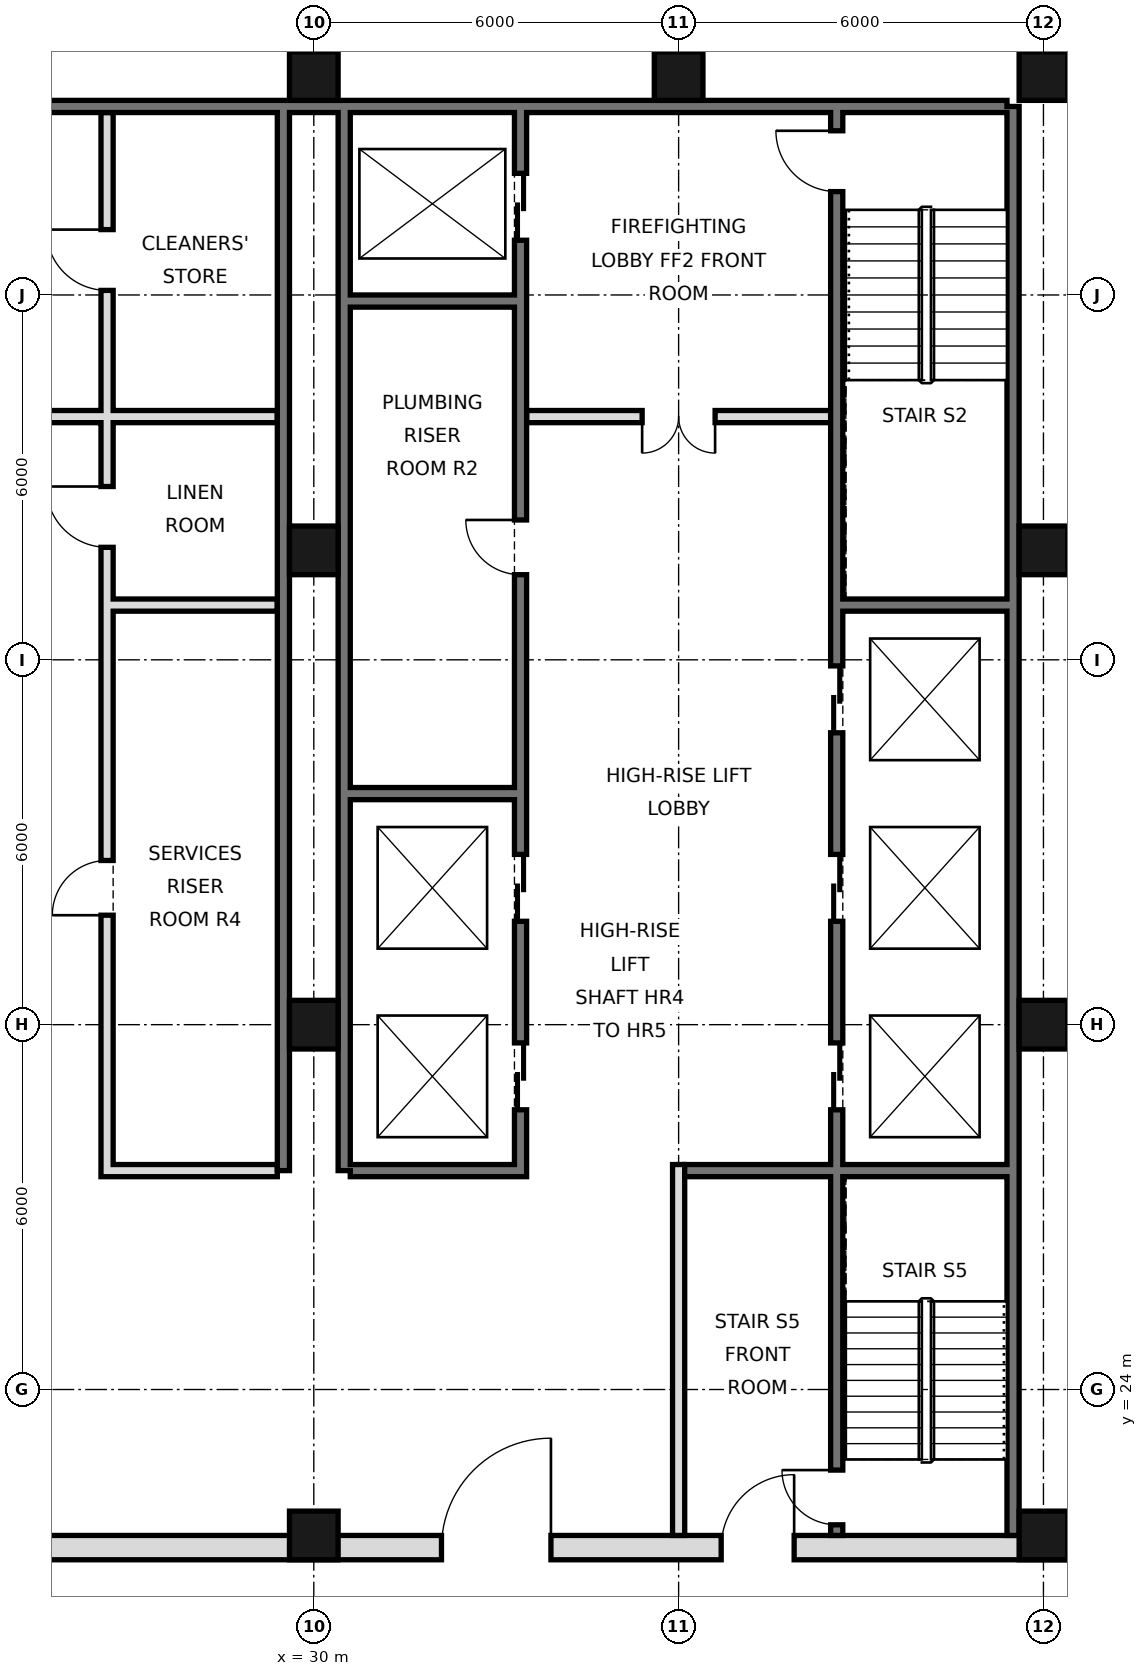
"""IFC4 building model, lengths in metres.
Left out: names, types, materials, properties, quantities, classifications, styles, units other than length and angle.
Written with IfcOpenShell. Run it as: python <this file> out.ifc"""

import sys

from ifc_helpers import new_model, si_unit, direction, frame, frame_2d, origin, origin_2d, place, context, subcontext, project, spatial, rectangle, hollow_rectangle, extrude, element, fill, save


model = new_model("IFC4")
c1 = context("Model", 3, precision=1e-05, world=origin(), true_north=direction((0.0, 1.0)))
c2 = subcontext(c1, "Body", "Model", "MODEL_VIEW")
j1 = project(units=[si_unit("LENGTHUNIT", "METRE"), si_unit("PLANEANGLEUNIT", "RADIAN")], contexts=[c1])
p1 = place(None, origin())
s1 = spatial("IfcSite", under=j1, at=p1, CompositionType="ELEMENT")
p2 = place(p1, origin())
s2 = spatial("IfcBuilding", under=s1, at=p2, CompositionType="ELEMENT")
p3 = place(p2, frame((0.0, 0.0, 298.0)))
s3 = spatial("IfcBuildingStorey", under=s2, at=p3, CompositionType="ELEMENT", Elevation=298.0)
for number, where, z_axis, x_axis in (
    (1, (30.0, 21.6, 0.0), (0.0, 0.0, 1.0), (1.0, 0.0, 0.0)),
    (2, (30.0, 30.0, 0.0), (0.0, 0.0, 1.0), (1.0, 0.0, 0.0)),
    (3, (30.0, 37.8, 0.0), (0.0, 0.0, 1.0), (1.0, 0.0, 0.0)),
    (4, (30.0, 45.6, 0.0), (0.0, 0.0, 1.0), (1.0, 0.0, 0.0)),
    (5, (36.0, 45.6, 0.0), (0.0, 0.0, 1.0), (1.0, 0.0, 0.0)),
    (6, (42.0, 21.6, 0.0), (0.0, 0.0, 1.0), (1.0, 0.0, 0.0)),
    (7, (42.0, 30.0, 0.0), (0.0, 0.0, 1.0), (1.0, 0.0, 0.0)),
    (8, (42.0, 37.8, 0.0), (0.0, 0.0, 1.0), (1.0, 0.0, 0.0)),
    (9, (42.0, 45.6, 0.0), (0.0, 0.0, 1.0), (1.0, 0.0, 0.0)),
):
    element("IfcColumn", number, at=place(p3, frame(where, z_axis=z_axis, x_axis=x_axis)), inside=s3, PredefinedType="COLUMN", context=c2, shape_type="SweptSolid", body=[
        extrude(hollow_rectangle(XDim=0.8, YDim=0.8, WallThickness=0.032, at=origin_2d()), origin(), (0.0, 0.0, 1.0), 3.6),
    ])
p4 = place(p3, frame((41.5, 21.6, 0.0), z_axis=(0.0, 0.0, 1.0), x_axis=(0.0, 1.0, 0.0)))
e10 = element("IfcWall", 10, at=p4, inside=s3, PredefinedType="SOLIDWALL", context=c2, shape_type="SweptSolid", body=[
    extrude(rectangle(XDim=23.5, YDim=0.2, at=frame_2d((11.75, 0.0))), origin(), (0.0, 0.0, 1.0), 3.42),
])
p5 = place(p3, frame((6.6, 45.1, 0.0), z_axis=(0.0, 0.0, 1.0), x_axis=(1.0, 0.0, 0.0)))
e11 = element("IfcWall", 11, at=p5, inside=s3, PredefinedType="SOLIDWALL", context=c2, shape_type="SweptSolid", body=[
    extrude(rectangle(XDim=34.8, YDim=0.2, at=frame_2d((17.4, 0.0))), origin(), (0.0, 0.0, 1.0), 3.42),
])
for number, where, z_axis, x_axis in (
    (12, (29.5, 27.6, 0.0), (0.0, 0.0, 1.0), (0.0, 1.0, 0.0)),
    (13, (30.5, 27.6, 0.0), (0.0, 0.0, 1.0), (0.0, 1.0, 0.0)),
):
    element("IfcWall", number, at=place(p3, frame(where, z_axis=z_axis, x_axis=x_axis)), inside=s3, PredefinedType="SOLIDWALL", context=c2, shape_type="SweptSolid", body=[
        extrude(rectangle(XDim=17.5, YDim=0.2, at=frame_2d((8.75, 0.0))), origin(), (0.0, 0.0, 1.0), 3.42),
    ])
p6 = place(p3, frame((5.6, 21.4, 0.0), z_axis=(0.0, 0.0, 1.0), x_axis=(1.0, 0.0, 0.0)))
e14 = element("IfcWall", 14, at=p6, inside=s3, PredefinedType="SOLIDWALL", context=c2, shape_type="SweptSolid", body=[
    extrude(rectangle(XDim=36.8, YDim=0.4, at=frame_2d((18.4, 0.0))), origin(), (0.0, 0.0, 1.0), 3.42),
])
p7 = place(p6, frame((8.5, 0.0, 0.0)))
e15 = element("IfcOpeningElement", 15, at=p7, cuts=e14, PredefinedType="OPENING", context=c2, shape_type="SweptSolid", body=[
    extrude(rectangle(XDim=1.8, YDim=2.1, at=frame_2d((0.9, 1.05))), frame((0.0, 0.21, 0.0), z_axis=(0.0, -1.0, 0.0), x_axis=(1.0, 0.0, 0.0)), (0.0, 0.0, 1.0), 0.42),
])
p8 = place(p6, frame((17.5, 0.0, 0.0)))
e16 = element("IfcOpeningElement", 16, at=p8, cuts=e14, PredefinedType="OPENING", context=c2, shape_type="SweptSolid", body=[
    extrude(rectangle(XDim=1.8, YDim=2.1, at=frame_2d((0.9, 1.05))), frame((0.0, 0.21, 0.0), z_axis=(0.0, -1.0, 0.0), x_axis=(1.0, 0.0, 0.0)), (0.0, 0.0, 1.0), 0.42),
])
p9 = place(p6, frame((26.5, 0.0, 0.0)))
e17 = element("IfcOpeningElement", 17, at=p9, cuts=e14, PredefinedType="OPENING", context=c2, shape_type="SweptSolid", body=[
    extrude(rectangle(XDim=1.8, YDim=2.1, at=frame_2d((0.9, 1.05))), frame((0.0, 0.21, 0.0), z_axis=(0.0, -1.0, 0.0), x_axis=(1.0, 0.0, 0.0)), (0.0, 0.0, 1.0), 0.42),
])
p10 = place(p6, frame((4.5, 0.0, 0.0)))
e18 = element("IfcOpeningElement", 18, at=p10, cuts=e14, PredefinedType="OPENING", context=c2, shape_type="SweptSolid", body=[
    extrude(rectangle(XDim=1.2, YDim=2.1, at=frame_2d((0.6, 1.05))), frame((0.0, 0.21, 0.0), z_axis=(0.0, -1.0, 0.0), x_axis=(1.0, 0.0, 0.0)), (0.0, 0.0, 1.0), 0.42),
])
p11 = place(p6, frame((31.1, 0.0, 0.0)))
e19 = element("IfcOpeningElement", 19, at=p11, cuts=e14, PredefinedType="OPENING", context=c2, shape_type="SweptSolid", body=[
    extrude(rectangle(XDim=1.2, YDim=2.1, at=frame_2d((0.6, 1.05))), frame((0.0, 0.21, 0.0), z_axis=(0.0, -1.0, 0.0), x_axis=(1.0, 0.0, 0.0)), (0.0, 0.0, 1.0), 0.42),
])
p12 = place(p3, frame((26.6, 27.5, 0.0), z_axis=(0.0, 0.0, 1.0), x_axis=(0.0, 1.0, 0.0)))
e20 = element("IfcWall", 20, at=p12, inside=s3, PredefinedType="SOLIDWALL", context=c2, shape_type="SweptSolid", body=[
    extrude(rectangle(XDim=17.5, YDim=0.2, at=frame_2d((8.75, 0.0))), origin(), (0.0, 0.0, 1.0), 3.42),
])
p13 = place(p12, frame((4.3, 0.0, 0.0)))
e21 = element("IfcOpeningElement", 21, at=p13, cuts=e20, PredefinedType="OPENING", context=c2, shape_type="SweptSolid", body=[
    extrude(rectangle(XDim=0.9, YDim=2.1, at=frame_2d((0.45, 1.05))), frame((0.0, 0.11, 0.0), z_axis=(0.0, -1.0, 0.0), x_axis=(1.0, 0.0, 0.0)), (0.0, 0.0, 1.0), 0.22),
])
p14 = place(p12, frame((10.35, 0.0, 0.0)))
e22 = element("IfcOpeningElement", 22, at=p14, cuts=e20, PredefinedType="OPENING", context=c2, shape_type="SweptSolid", body=[
    extrude(rectangle(XDim=1.0, YDim=2.1, at=frame_2d((0.5, 1.05))), frame((0.0, 0.11, 0.0), z_axis=(0.0, -1.0, 0.0), x_axis=(1.0, 0.0, 0.0)), (0.0, 0.0, 1.0), 0.22),
])
p15 = place(p12, frame((14.575, 0.0, 0.0)))
e23 = element("IfcOpeningElement", 23, at=p15, cuts=e20, PredefinedType="OPENING", context=c2, shape_type="SweptSolid", body=[
    extrude(rectangle(XDim=1.0, YDim=2.1, at=frame_2d((0.5, 1.05))), frame((0.0, 0.11, 0.0), z_axis=(0.0, -1.0, 0.0), x_axis=(1.0, 0.0, 0.0)), (0.0, 0.0, 1.0), 0.22),
])
p16 = place(p3, frame((33.4, 27.5, 0.0), z_axis=(0.0, 0.0, 1.0), x_axis=(0.0, 1.0, 0.0)))
e24 = element("IfcWall", 24, at=p16, inside=s3, PredefinedType="SOLIDWALL", context=c2, shape_type="SweptSolid", body=[
    extrude(rectangle(XDim=17.5, YDim=0.2, at=frame_2d((8.75, 0.0))), origin(), (0.0, 0.0, 1.0), 3.42),
])
p17 = place(p16, frame((1.1, 0.0, 0.0)))
e25 = element("IfcOpeningElement", 25, at=p17, cuts=e24, PredefinedType="OPENING", context=c2, shape_type="SweptSolid", body=[
    extrude(rectangle(XDim=1.1, YDim=2.1, at=frame_2d((0.55, 1.05))), frame((0.0, 0.11, 0.0), z_axis=(0.0, -1.0, 0.0), x_axis=(1.0, 0.0, 0.0)), (0.0, 0.0, 1.0), 0.22),
])
p18 = place(p16, frame((4.2, 0.0, 0.0)))
e26 = element("IfcOpeningElement", 26, at=p18, cuts=e24, PredefinedType="OPENING", context=c2, shape_type="SweptSolid", body=[
    extrude(rectangle(XDim=1.1, YDim=2.1, at=frame_2d((0.55, 1.05))), frame((0.0, 0.11, 0.0), z_axis=(0.0, -1.0, 0.0), x_axis=(1.0, 0.0, 0.0)), (0.0, 0.0, 1.0), 0.22),
])
p19 = place(p16, frame((15.4, 0.0, 0.0)))
e27 = element("IfcOpeningElement", 27, at=p19, cuts=e24, PredefinedType="OPENING", context=c2, shape_type="SweptSolid", body=[
    extrude(rectangle(XDim=1.1, YDim=2.1, at=frame_2d((0.55, 1.05))), frame((0.0, 0.11, 0.0), z_axis=(0.0, -1.0, 0.0), x_axis=(1.0, 0.0, 0.0)), (0.0, 0.0, 1.0), 0.22),
])
p20 = place(p16, frame((9.9, 0.0, 0.0)))
e28 = element("IfcOpeningElement", 28, at=p20, cuts=e24, PredefinedType="OPENING", context=c2, shape_type="SweptSolid", body=[
    extrude(rectangle(XDim=0.9, YDim=2.1, at=frame_2d((0.45, 1.05))), frame((0.0, 0.11, 0.0), z_axis=(0.0, -1.0, 0.0), x_axis=(1.0, 0.0, 0.0)), (0.0, 0.0, 1.0), 0.22),
])
p21 = place(p3, frame((36.0, 21.6, 0.0), z_axis=(0.0, 0.0, 1.0), x_axis=(0.0, 1.0, 0.0)))
e29 = element("IfcWall", 29, at=p21, inside=s3, PredefinedType="PARTITIONING", context=c2, shape_type="SweptSolid", body=[
    extrude(rectangle(XDim=6.1, YDim=0.2, at=frame_2d((3.05, 0.0))), origin(), (0.0, 0.0, 1.0), 3.42),
])
p22 = place(p3, frame((38.6, 21.6, 0.0), z_axis=(0.0, 0.0, 1.0), x_axis=(0.0, 1.0, 0.0)))
e30 = element("IfcWall", 30, at=p22, inside=s3, PredefinedType="SOLIDWALL", context=c2, shape_type="SweptSolid", body=[
    extrude(rectangle(XDim=23.4, YDim=0.2, at=frame_2d((11.7, 0.0))), origin(), (0.0, 0.0, 1.0), 3.42),
])
p23 = place(p22, frame((7.0, 0.0, 0.0)))
e31 = element("IfcOpeningElement", 31, at=p23, cuts=e30, PredefinedType="OPENING", context=c2, shape_type="SweptSolid", body=[
    extrude(rectangle(XDim=1.1, YDim=2.1, at=frame_2d((0.55, 1.05))), frame((0.0, 0.11, 0.0), z_axis=(0.0, -1.0, 0.0), x_axis=(1.0, 0.0, 0.0)), (0.0, 0.0, 1.0), 0.22),
])
p24 = place(p22, frame((10.1, 0.0, 0.0)))
e32 = element("IfcOpeningElement", 32, at=p24, cuts=e30, PredefinedType="OPENING", context=c2, shape_type="SweptSolid", body=[
    extrude(rectangle(XDim=1.1, YDim=2.1, at=frame_2d((0.55, 1.05))), frame((0.0, 0.11, 0.0), z_axis=(0.0, -1.0, 0.0), x_axis=(1.0, 0.0, 0.0)), (0.0, 0.0, 1.0), 0.22),
])
p25 = place(p22, frame((13.2, 0.0, 0.0)))
e33 = element("IfcOpeningElement", 33, at=p25, cuts=e30, PredefinedType="OPENING", context=c2, shape_type="SweptSolid", body=[
    extrude(rectangle(XDim=1.1, YDim=2.1, at=frame_2d((0.55, 1.05))), frame((0.0, 0.11, 0.0), z_axis=(0.0, -1.0, 0.0), x_axis=(1.0, 0.0, 0.0)), (0.0, 0.0, 1.0), 0.22),
])
p26 = place(p22, frame((22.1, 0.0, 0.0)))
e34 = element("IfcOpeningElement", 34, at=p26, cuts=e30, PredefinedType="OPENING", context=c2, shape_type="SweptSolid", body=[
    extrude(rectangle(XDim=1.0, YDim=2.1, at=frame_2d((0.5, 1.05))), frame((0.0, 0.11, 0.0), z_axis=(0.0, -1.0, 0.0), x_axis=(1.0, 0.0, 0.0)), (0.0, 0.0, 1.0), 0.22),
])
p27 = place(p22, frame((0.175, 0.0, 0.0)))
e35 = element("IfcOpeningElement", 35, at=p27, cuts=e30, PredefinedType="OPENING", context=c2, shape_type="SweptSolid", body=[
    extrude(rectangle(XDim=0.9, YDim=2.1, at=frame_2d((0.45, 1.05))), frame((0.0, 0.11, 0.0), z_axis=(0.0, -1.0, 0.0), x_axis=(1.0, 0.0, 0.0)), (0.0, 0.0, 1.0), 0.22),
])
for number, where, z_axis, x_axis in (
    (36, (26.7, 27.6, 0.0), (0.0, 0.0, 1.0), (1.0, 0.0, 0.0)),
    (37, (30.6, 27.6, 0.0), (0.0, 0.0, 1.0), (1.0, 0.0, 0.0)),
):
    element("IfcWall", number, at=place(p3, frame(where, z_axis=z_axis, x_axis=x_axis)), inside=s3, PredefinedType="SOLIDWALL", context=c2, shape_type="SweptSolid", body=[
        extrude(rectangle(XDim=2.7, YDim=0.2, at=frame_2d((1.35, 0.0))), origin(), (0.0, 0.0, 1.0), 3.42),
    ])
p28 = place(p3, frame((36.1, 27.6, 0.0), z_axis=(0.0, 0.0, 1.0), x_axis=(1.0, 0.0, 0.0)))
e38 = element("IfcWall", 38, at=p28, inside=s3, PredefinedType="SOLIDWALL", context=c2, shape_type="SweptSolid", body=[
    extrude(rectangle(XDim=5.3, YDim=0.2, at=frame_2d((2.65, 0.0))), origin(), (0.0, 0.0, 1.0), 3.42),
])
for number, where, z_axis, x_axis in (
    (39, (30.6, 33.8, 0.0), (0.0, 0.0, 1.0), (1.0, 0.0, 0.0)),
    (40, (26.7, 36.9, 0.0), (0.0, 0.0, 1.0), (1.0, 0.0, 0.0)),
    (41, (38.7, 36.9, 0.0), (0.0, 0.0, 1.0), (1.0, 0.0, 0.0)),
):
    element("IfcWall", number, at=place(p3, frame(where, z_axis=z_axis, x_axis=x_axis)), inside=s3, PredefinedType="SOLIDWALL", context=c2, shape_type="SweptSolid", body=[
        extrude(rectangle(XDim=2.7, YDim=0.2, at=frame_2d((1.35, 0.0))), origin(), (0.0, 0.0, 1.0), 3.42),
    ])
p29 = place(p3, frame((21.5, 40.0, 0.0), z_axis=(0.0, 0.0, 1.0), x_axis=(1.0, 0.0, 0.0)))
e42 = element("IfcWall", 42, at=p29, inside=s3, PredefinedType="PARTITIONING", context=c2, shape_type="SweptSolid", body=[
    extrude(rectangle(XDim=7.9, YDim=0.2, at=frame_2d((3.95, 0.0))), origin(), (0.0, 0.0, 1.0), 3.42),
])
p30 = place(p29, frame((1.9, 0.0, 0.0)))
e43 = element("IfcOpeningElement", 43, at=p30, cuts=e42, PredefinedType="OPENING", context=c2, shape_type="SweptSolid", body=[
    extrude(rectangle(XDim=1.2, YDim=2.1, at=frame_2d((0.6, 1.05))), frame((0.0, 0.11, 0.0), z_axis=(0.0, -1.0, 0.0), x_axis=(1.0, 0.0, 0.0)), (0.0, 0.0, 1.0), 0.22),
])
p31 = place(p3, frame((33.5, 40.0, 0.0), z_axis=(0.0, 0.0, 1.0), x_axis=(1.0, 0.0, 0.0)))
e44 = element("IfcWall", 44, at=p31, inside=s3, PredefinedType="PARTITIONING", context=c2, shape_type="SweptSolid", body=[
    extrude(rectangle(XDim=5.0, YDim=0.2, at=frame_2d((2.5, 0.0))), origin(), (0.0, 0.0, 1.0), 3.42),
])
p32 = place(p31, frame((1.9, 0.0, 0.0)))
e45 = element("IfcOpeningElement", 45, at=p32, cuts=e44, PredefinedType="OPENING", context=c2, shape_type="SweptSolid", body=[
    extrude(rectangle(XDim=1.2, YDim=2.1, at=frame_2d((0.6, 1.05))), frame((0.0, 0.11, 0.0), z_axis=(0.0, -1.0, 0.0), x_axis=(1.0, 0.0, 0.0)), (0.0, 0.0, 1.0), 0.22),
])
p33 = place(p3, frame((30.6, 41.9, 0.0), z_axis=(0.0, 0.0, 1.0), x_axis=(1.0, 0.0, 0.0)))
e46 = element("IfcWall", 46, at=p33, inside=s3, PredefinedType="SOLIDWALL", context=c2, shape_type="SweptSolid", body=[
    extrude(rectangle(XDim=2.7, YDim=0.2, at=frame_2d((1.35, 0.0))), origin(), (0.0, 0.0, 1.0), 3.42),
])
p34 = place(p9, frame((1.8, 0.0, 0.0), z_axis=(0.0, 0.0, 1.0), x_axis=(-1.0, 0.0, 0.0)))
e47 = element("IfcDoor", 47, at=p34, inside=s3, OperationType="SINGLE_SWING_LEFT", PredefinedType="DOOR", context=c2, shape_type="SweptSolid", body=[
    extrude(rectangle(XDim=1.8, YDim=2.1, at=frame_2d((0.9, 1.05))), frame((0.0, 0.025, 0.0), z_axis=(0.0, -1.0, 0.0), x_axis=(1.0, 0.0, 0.0)), (0.0, 0.0, 1.0), 0.05),
])
fill(e17, e47)
p35 = place(p11, frame((1.2, 0.0, 0.0), z_axis=(0.0, 0.0, 1.0), x_axis=(-1.0, 0.0, 0.0)))
e48 = element("IfcDoor", 48, at=p35, inside=s3, OperationType="SINGLE_SWING_LEFT", PredefinedType="DOOR", context=c2, shape_type="SweptSolid", body=[
    extrude(rectangle(XDim=1.2, YDim=2.1, at=frame_2d((0.6, 1.05))), frame((0.0, 0.025, 0.0), z_axis=(0.0, -1.0, 0.0), x_axis=(1.0, 0.0, 0.0)), (0.0, 0.0, 1.0), 0.05),
])
fill(e19, e48)
p36 = place(p32, frame((1.2, 0.0, 0.0), z_axis=(0.0, 0.0, 1.0), x_axis=(-1.0, 0.0, 0.0)))
e49 = element("IfcDoor", 49, at=p36, inside=s3, OperationType="DOUBLE_DOOR_SINGLE_SWING", PredefinedType="DOOR", context=c2, shape_type="SweptSolid", body=[
    extrude(rectangle(XDim=1.2, YDim=2.1, at=frame_2d((0.6, 1.05))), frame((0.0, 0.025, 0.0), z_axis=(0.0, -1.0, 0.0), x_axis=(1.0, 0.0, 0.0)), (0.0, 0.0, 1.0), 0.05),
])
fill(e45, e49)
p37 = place(p23, origin())
e50 = element("IfcDoor", 50, at=p37, inside=s3, OperationType="DOUBLE_DOOR_SLIDING", PredefinedType="DOOR", context=c2, shape_type="SweptSolid", body=[
    extrude(rectangle(XDim=1.1, YDim=2.1, at=frame_2d((0.55, 1.05))), frame((0.0, 0.025, 0.0), z_axis=(0.0, -1.0, 0.0), x_axis=(1.0, 0.0, 0.0)), (0.0, 0.0, 1.0), 0.05),
])
fill(e31, e50)
p38 = place(p24, origin())
e51 = element("IfcDoor", 51, at=p38, inside=s3, OperationType="DOUBLE_DOOR_SLIDING", PredefinedType="DOOR", context=c2, shape_type="SweptSolid", body=[
    extrude(rectangle(XDim=1.1, YDim=2.1, at=frame_2d((0.55, 1.05))), frame((0.0, 0.025, 0.0), z_axis=(0.0, -1.0, 0.0), x_axis=(1.0, 0.0, 0.0)), (0.0, 0.0, 1.0), 0.05),
])
fill(e32, e51)
p39 = place(p25, origin())
e52 = element("IfcDoor", 52, at=p39, inside=s3, OperationType="DOUBLE_DOOR_SLIDING", PredefinedType="DOOR", context=c2, shape_type="SweptSolid", body=[
    extrude(rectangle(XDim=1.1, YDim=2.1, at=frame_2d((0.55, 1.05))), frame((0.0, 0.025, 0.0), z_axis=(0.0, -1.0, 0.0), x_axis=(1.0, 0.0, 0.0)), (0.0, 0.0, 1.0), 0.05),
])
fill(e33, e52)
p40 = place(p17, origin())
e53 = element("IfcDoor", 53, at=p40, inside=s3, OperationType="DOUBLE_DOOR_SLIDING", PredefinedType="DOOR", context=c2, shape_type="SweptSolid", body=[
    extrude(rectangle(XDim=1.1, YDim=2.1, at=frame_2d((0.55, 1.05))), frame((0.0, 0.025, 0.0), z_axis=(0.0, -1.0, 0.0), x_axis=(1.0, 0.0, 0.0)), (0.0, 0.0, 1.0), 0.05),
])
fill(e25, e53)
p41 = place(p18, origin())
e54 = element("IfcDoor", 54, at=p41, inside=s3, OperationType="DOUBLE_DOOR_SLIDING", PredefinedType="DOOR", context=c2, shape_type="SweptSolid", body=[
    extrude(rectangle(XDim=1.1, YDim=2.1, at=frame_2d((0.55, 1.05))), frame((0.0, 0.025, 0.0), z_axis=(0.0, -1.0, 0.0), x_axis=(1.0, 0.0, 0.0)), (0.0, 0.0, 1.0), 0.05),
])
fill(e26, e54)
p42 = place(p19, origin())
e55 = element("IfcDoor", 55, at=p42, inside=s3, OperationType="DOUBLE_DOOR_SLIDING", PredefinedType="DOOR", context=c2, shape_type="SweptSolid", body=[
    extrude(rectangle(XDim=1.1, YDim=2.1, at=frame_2d((0.55, 1.05))), frame((0.0, 0.025, 0.0), z_axis=(0.0, -1.0, 0.0), x_axis=(1.0, 0.0, 0.0)), (0.0, 0.0, 1.0), 0.05),
])
fill(e27, e55)
p43 = place(p26, frame((1.0, 0.0, 0.0), z_axis=(0.0, 0.0, 1.0), x_axis=(-1.0, 0.0, 0.0)))
e56 = element("IfcDoor", 56, at=p43, inside=s3, OperationType="SINGLE_SWING_LEFT", PredefinedType="DOOR", context=c2, shape_type="SweptSolid", body=[
    extrude(rectangle(XDim=1.0, YDim=2.1, at=frame_2d((0.5, 1.05))), frame((0.0, 0.025, 0.0), z_axis=(0.0, -1.0, 0.0), x_axis=(1.0, 0.0, 0.0)), (0.0, 0.0, 1.0), 0.05),
])
fill(e34, e56)
p44 = place(p27, frame((0.9, 0.0, 0.0), z_axis=(0.0, 0.0, 1.0), x_axis=(-1.0, 0.0, 0.0)))
e57 = element("IfcDoor", 57, at=p44, inside=s3, OperationType="SINGLE_SWING_LEFT", PredefinedType="DOOR", context=c2, shape_type="SweptSolid", body=[
    extrude(rectangle(XDim=0.9, YDim=2.1, at=frame_2d((0.45, 1.05))), frame((0.0, 0.025, 0.0), z_axis=(0.0, -1.0, 0.0), x_axis=(1.0, 0.0, 0.0)), (0.0, 0.0, 1.0), 0.05),
])
fill(e35, e57)
p45 = place(p20, frame((0.9, 0.0, 0.0), z_axis=(0.0, 0.0, 1.0), x_axis=(-1.0, 0.0, 0.0)))
e58 = element("IfcDoor", 58, at=p45, inside=s3, OperationType="SINGLE_SWING_LEFT", PredefinedType="DOOR", context=c2, shape_type="SweptSolid", body=[
    extrude(rectangle(XDim=0.9, YDim=2.1, at=frame_2d((0.45, 1.05))), frame((0.0, 0.025, 0.0), z_axis=(0.0, -1.0, 0.0), x_axis=(1.0, 0.0, 0.0)), (0.0, 0.0, 1.0), 0.05),
])
fill(e28, e58)
p46 = place(p13, origin())
e59 = element("IfcDoor", 59, at=p46, inside=s3, OperationType="SINGLE_SWING_LEFT", PredefinedType="DOOR", context=c2, shape_type="SweptSolid", body=[
    extrude(rectangle(XDim=0.9, YDim=2.1, at=frame_2d((0.45, 1.05))), frame((0.0, 0.025, 0.0), z_axis=(0.0, -1.0, 0.0), x_axis=(1.0, 0.0, 0.0)), (0.0, 0.0, 1.0), 0.05),
])
fill(e21, e59)
p47 = place(p14, frame((1.0, 0.0, 0.0), z_axis=(0.0, 0.0, 1.0), x_axis=(-1.0, 0.0, 0.0)))
e60 = element("IfcDoor", 60, at=p47, inside=s3, OperationType="SINGLE_SWING_LEFT", PredefinedType="DOOR", context=c2, shape_type="SweptSolid", body=[
    extrude(rectangle(XDim=1.0, YDim=2.1, at=frame_2d((0.5, 1.05))), frame((0.0, 0.025, 0.0), z_axis=(0.0, -1.0, 0.0), x_axis=(1.0, 0.0, 0.0)), (0.0, 0.0, 1.0), 0.05),
])
fill(e22, e60)
p48 = place(p15, frame((1.0, 0.0, 0.0), z_axis=(0.0, 0.0, 1.0), x_axis=(-1.0, 0.0, 0.0)))
e61 = element("IfcDoor", 61, at=p48, inside=s3, OperationType="SINGLE_SWING_LEFT", PredefinedType="DOOR", context=c2, shape_type="SweptSolid", body=[
    extrude(rectangle(XDim=1.0, YDim=2.1, at=frame_2d((0.5, 1.05))), frame((0.0, 0.025, 0.0), z_axis=(0.0, -1.0, 0.0), x_axis=(1.0, 0.0, 0.0)), (0.0, 0.0, 1.0), 0.05),
])
fill(e23, e61)
save(model, sys.argv[1])
